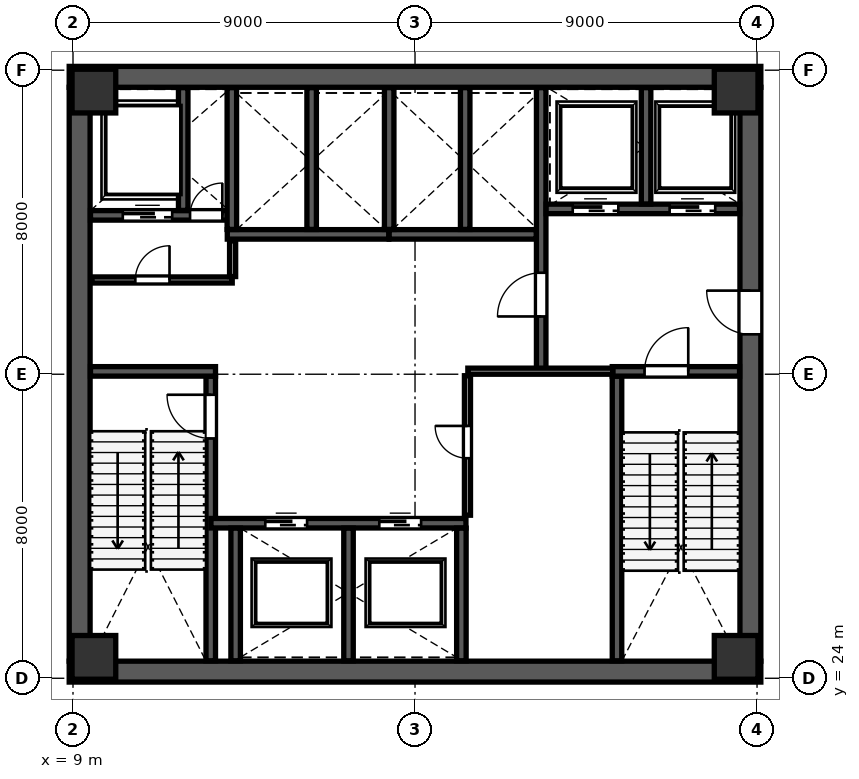
"""IFC4 building model, lengths in metres.
Left out: names, types, materials, properties, quantities, classifications, styles, units other than length and angle.
Written with IfcOpenShell. Run it as: python <this file> out.ifc"""

import sys

from ifc_helpers import new_model, si_unit, direction, frame, frame_2d, origin, origin_2d, place, context, subcontext, project, spatial, rectangle, extrude, source, transform, mapped, element, fill, save


model = new_model("IFC4")
c1 = context("Model", 3, precision=1e-05, world=origin(), true_north=direction((0.0, 1.0)))
c2 = subcontext(c1, "Body", "Model", "MODEL_VIEW")
j1 = project(units=[si_unit("LENGTHUNIT", "METRE"), si_unit("PLANEANGLEUNIT", "RADIAN")], contexts=[c1])
p1 = place(None, origin())
s1 = spatial("IfcSite", under=j1, at=p1, CompositionType="ELEMENT")
p2 = place(p1, origin())
s2 = spatial("IfcBuilding", under=s1, at=p2, CompositionType="ELEMENT")
p3 = place(p2, frame((0.0, 0.0, 32.8)))
s3 = spatial("IfcBuildingStorey", under=s2, at=p3, CompositionType="ELEMENT", Elevation=32.8)
m1 = source(origin(), c2, "Body", "SweptSolid", [
    extrude(rectangle(XDim=1.15, YDim=1.15, at=origin_2d()), origin(), (0.0, 0.0, 1.0), 4.799),
])
for number, where, z_axis, x_axis in (
    (1, (9.55, 24.55, 0.001), (0.0, 0.0, 1.0), (1.0, 0.0, 0.0)),
    (2, (26.45, 24.55, 0.001), (0.0, 0.0, 1.0), (1.0, 0.0, 0.0)),
    (3, (9.55, 39.45, 0.001), (0.0, 0.0, 1.0), (1.0, 0.0, 0.0)),
    (4, (26.45, 39.45, 0.001), (0.0, 0.0, 1.0), (1.0, 0.0, 0.0)),
):
    element("IfcColumn", number, at=place(p3, frame(where, z_axis=z_axis, x_axis=x_axis)), inside=s3, PredefinedType="COLUMN", context=c2, shape_type="MappedRepresentation", body=[
        mapped(m1, transform((0.0, 0.0, 0.0), scale=1.0)),
    ])
p4 = place(p3, frame((9.175, 24.45, 0.0), z_axis=(0.0, 0.0, 1.0), x_axis=(0.0, 1.0, 0.0)))
e5 = element("IfcWall", 5, at=p4, inside=s3, PredefinedType="SHEAR", context=c2, shape_type="SweptSolid", body=[
    extrude(rectangle(XDim=15.1, YDim=0.55, at=frame_2d((7.55, 0.0))), origin(), (0.0, 0.0, 1.0), 4.56),
])
p5 = place(p3, frame((26.825, 24.45, 0.0), z_axis=(0.0, 0.0, 1.0), x_axis=(0.0, 1.0, 0.0)))
e6 = element("IfcWall", 6, at=p5, inside=s3, PredefinedType="SHEAR", context=c2, shape_type="SweptSolid", body=[
    extrude(rectangle(XDim=15.1, YDim=0.55, at=frame_2d((7.55, 0.0))), origin(), (0.0, 0.0, 1.0), 4.56),
])
p6 = place(p5, frame((8.6, 0.0, 0.0)))
e7 = element("IfcOpeningElement", 7, at=p6, cuts=e6, PredefinedType="OPENING", context=c2, shape_type="SweptSolid", body=[
    extrude(rectangle(XDim=1.15, YDim=2.2, at=frame_2d((0.575, 1.1))), frame((0.0, 0.285, 0.0), z_axis=(0.0, -1.0, 0.0), x_axis=(1.0, 0.0, 0.0)), (0.0, 0.0, 1.0), 0.57),
])
for number, where, z_axis, x_axis in (
    (8, (8.9, 24.175, 0.0), (0.0, 0.0, 1.0), (1.0, 0.0, 0.0)),
    (9, (8.9, 39.825, 0.0), (0.0, 0.0, 1.0), (1.0, 0.0, 0.0)),
):
    element("IfcWall", number, at=place(p3, frame(where, z_axis=z_axis, x_axis=x_axis)), inside=s3, PredefinedType="SHEAR", context=c2, shape_type="SweptSolid", body=[
        extrude(rectangle(XDim=18.2, YDim=0.55, at=frame_2d((9.1, 0.0))), origin(), (0.0, 0.0, 1.0), 4.56),
    ])
p7 = place(p3, frame((12.625, 24.46, 0.0), z_axis=(0.0, 0.0, 1.0), x_axis=(0.0, 1.0, 0.0)))
e10 = element("IfcWall", 10, at=p7, inside=s3, PredefinedType="SHEAR", context=c2, shape_type="SweptSolid", body=[
    extrude(rectangle(XDim=7.49, YDim=0.25, at=frame_2d((3.745, 0.0))), origin(), (0.0, 0.0, 1.0), 4.56),
])
p8 = place(p7, frame((5.85, 0.0, 0.0)))
e11 = element("IfcOpeningElement", 11, at=p8, cuts=e10, PredefinedType="OPENING", context=c2, shape_type="SweptSolid", body=[
    extrude(rectangle(XDim=1.15, YDim=2.2, at=frame_2d((0.575, 1.1))), frame((0.0, 0.135, 0.0), z_axis=(0.0, -1.0, 0.0), x_axis=(1.0, 0.0, 0.0)), (0.0, 0.0, 1.0), 0.27),
])
p9 = place(p3, frame((9.46, 32.075, 0.0), z_axis=(0.0, 0.0, 1.0), x_axis=(1.0, 0.0, 0.0)))
e12 = element("IfcWall", 12, at=p9, inside=s3, PredefinedType="SHEAR", context=c2, shape_type="SweptSolid", body=[
    extrude(rectangle(XDim=3.29, YDim=0.25, at=frame_2d((1.645, 0.0))), origin(), (0.0, 0.0, 1.0), 4.56),
])
p10 = place(p3, frame((23.315, 24.46, 0.0), z_axis=(0.0, 0.0, 1.0), x_axis=(0.0, 1.0, 0.0)))
e13 = element("IfcWall", 13, at=p10, inside=s3, PredefinedType="SHEAR", context=c2, shape_type="SweptSolid", body=[
    extrude(rectangle(XDim=7.49, YDim=0.25, at=frame_2d((3.745, 0.0))), origin(), (0.0, 0.0, 1.0), 4.56),
])
p11 = place(p3, frame((23.19, 32.075, 0.0), z_axis=(0.0, 0.0, 1.0), x_axis=(1.0, 0.0, 0.0)))
e14 = element("IfcWall", 14, at=p11, inside=s3, PredefinedType="SHEAR", context=c2, shape_type="SweptSolid", body=[
    extrude(rectangle(XDim=3.35, YDim=0.25, at=frame_2d((1.675, 0.0))), origin(), (0.0, 0.0, 1.0), 4.56),
])
p12 = place(p11, frame((0.85, 0.0, 0.0)))
e15 = element("IfcOpeningElement", 15, at=p12, cuts=e14, PredefinedType="OPENING", context=c2, shape_type="SweptSolid", body=[
    extrude(rectangle(XDim=1.15, YDim=2.2, at=frame_2d((0.575, 1.1))), frame((0.0, 0.135, 0.0), z_axis=(0.0, -1.0, 0.0), x_axis=(1.0, 0.0, 0.0)), (0.0, 0.0, 1.0), 0.27),
])
p13 = place(p3, frame((21.32, 32.12, 0.0), z_axis=(0.0, 0.0, 1.0), x_axis=(0.0, 1.0, 0.0)))
e16 = element("IfcWall", 16, at=p13, inside=s3, PredefinedType="SHEAR", context=c2, shape_type="SweptSolid", body=[
    extrude(rectangle(XDim=7.42, YDim=0.25, at=frame_2d((3.71, 0.0))), origin(), (0.0, 0.0, 1.0), 4.56),
])
p14 = place(p13, frame((1.4, 0.0, 0.0)))
e17 = element("IfcOpeningElement", 17, at=p14, cuts=e16, PredefinedType="OPENING", context=c2, shape_type="SweptSolid", body=[
    extrude(rectangle(XDim=1.15, YDim=2.2, at=frame_2d((0.575, 1.1))), frame((0.0, 0.135, 0.0), z_axis=(0.0, -1.0, 0.0), x_axis=(1.0, 0.0, 0.0)), (0.0, 0.0, 1.0), 0.27),
])
p15 = place(p3, frame((9.46, 36.18, 0.0), z_axis=(0.0, 0.0, 1.0), x_axis=(1.0, 0.0, 0.0)))
e18 = element("IfcWall", 18, at=p15, inside=s3, PredefinedType="SHEAR", context=c2, shape_type="SweptSolid", body=[
    extrude(rectangle(XDim=3.79, YDim=0.25, at=frame_2d((1.895, 0.0))), origin(), (0.0, 0.0, 1.0), 4.56),
])
p16 = place(p15, frame((2.62, 0.0, 0.0)))
e19 = element("IfcOpeningElement", 19, at=p16, cuts=e18, PredefinedType="OPENING", context=c2, shape_type="SweptSolid", body=[
    extrude(rectangle(XDim=0.85, YDim=2.1, at=frame_2d((0.425, 1.05))), frame((0.0, 0.135, 0.0), z_axis=(0.0, -1.0, 0.0), x_axis=(1.0, 0.0, 0.0)), (0.0, 0.0, 1.0), 0.27),
])
p17 = place(p15, frame((0.85, 0.0, 0.0)))
e20 = element("IfcOpeningElement", 20, at=p17, cuts=e18, PredefinedType="OPENING", context=c2, shape_type="SweptSolid", body=[
    extrude(rectangle(XDim=1.3, YDim=2.25, at=frame_2d((0.65, 1.125))), frame((0.0, 0.135, 0.0), z_axis=(0.0, -1.0, 0.0), x_axis=(1.0, 0.0, 0.0)), (0.0, 0.0, 1.0), 0.27),
])
p18 = place(p3, frame((11.9, 36.31, 0.0), z_axis=(0.0, 0.0, 1.0), x_axis=(0.0, 1.0, 0.0)))
e21 = element("IfcWall", 21, at=p18, inside=s3, PredefinedType="SHEAR", context=c2, shape_type="SweptSolid", body=[
    extrude(rectangle(XDim=3.23, YDim=0.25, at=frame_2d((1.615, 0.0))), origin(), (0.0, 0.0, 1.0), 4.56),
])
p19 = place(p3, frame((21.45, 36.35, 0.0), z_axis=(0.0, 0.0, 1.0), x_axis=(1.0, 0.0, 0.0)))
e22 = element("IfcWall", 22, at=p19, inside=s3, PredefinedType="SHEAR", context=c2, shape_type="SweptSolid", body=[
    extrude(rectangle(XDim=5.09, YDim=0.25, at=frame_2d((2.545, 0.0))), origin(), (0.0, 0.0, 1.0), 4.56),
])
p20 = place(p19, frame((0.7, 0.0, 0.0)))
e23 = element("IfcOpeningElement", 23, at=p20, cuts=e22, PredefinedType="OPENING", context=c2, shape_type="SweptSolid", body=[
    extrude(rectangle(XDim=1.2, YDim=2.2, at=frame_2d((0.6, 1.1))), frame((0.0, 0.135, 0.0), z_axis=(0.0, -1.0, 0.0), x_axis=(1.0, 0.0, 0.0)), (0.0, 0.0, 1.0), 0.27),
])
p21 = place(p19, frame((3.25, 0.0, 0.0)))
e24 = element("IfcOpeningElement", 24, at=p21, cuts=e22, PredefinedType="OPENING", context=c2, shape_type="SweptSolid", body=[
    extrude(rectangle(XDim=1.2, YDim=2.2, at=frame_2d((0.6, 1.1))), frame((0.0, 0.135, 0.0), z_axis=(0.0, -1.0, 0.0), x_axis=(1.0, 0.0, 0.0)), (0.0, 0.0, 1.0), 0.27),
])
p22 = place(p3, frame((24.08, 36.48, 0.0), z_axis=(0.0, 0.0, 1.0), x_axis=(0.0, 1.0, 0.0)))
e25 = element("IfcWall", 25, at=p22, inside=s3, PredefinedType="SHEAR", context=c2, shape_type="SweptSolid", body=[
    extrude(rectangle(XDim=3.06, YDim=0.25, at=frame_2d((1.53, 0.0))), origin(), (0.0, 0.0, 1.0), 4.56),
])
p23 = place(p3, frame((12.63, 28.08, 0.0), z_axis=(0.0, 0.0, 1.0), x_axis=(1.0, 0.0, 0.0)))
e26 = element("IfcWall", 26, at=p23, inside=s3, PredefinedType="SHEAR", context=c2, shape_type="SweptSolid", body=[
    extrude(rectangle(XDim=6.71, YDim=0.25, at=frame_2d((3.355, 0.0))), origin(), (0.0, 0.0, 1.0), 4.56),
])
p24 = place(p23, frame((1.43, 0.0, 0.0)))
e27 = element("IfcOpeningElement", 27, at=p24, cuts=e26, PredefinedType="OPENING", context=c2, shape_type="SweptSolid", body=[
    extrude(rectangle(XDim=1.1, YDim=2.2, at=frame_2d((0.55, 1.1))), frame((0.0, 0.135, 0.0), z_axis=(0.0, -1.0, 0.0), x_axis=(1.0, 0.0, 0.0)), (0.0, 0.0, 1.0), 0.27),
])
p25 = place(p23, frame((4.43, 0.0, 0.0)))
e28 = element("IfcOpeningElement", 28, at=p25, cuts=e26, PredefinedType="OPENING", context=c2, shape_type="SweptSolid", body=[
    extrude(rectangle(XDim=1.1, YDim=2.2, at=frame_2d((0.55, 1.1))), frame((0.0, 0.135, 0.0), z_axis=(0.0, -1.0, 0.0), x_axis=(1.0, 0.0, 0.0)), (0.0, 0.0, 1.0), 0.27),
])
for number, where, z_axis, x_axis in (
    (29, (13.28, 24.46, 0.0), (0.0, 0.0, 1.0), (0.0, 1.0, 0.0)),
    (30, (16.25, 24.46, 0.0), (0.0, 0.0, 1.0), (0.0, 1.0, 0.0)),
    (31, (19.22, 24.46, 0.0), (0.0, 0.0, 1.0), (0.0, 1.0, 0.0)),
):
    element("IfcWall", number, at=place(p3, frame(where, z_axis=z_axis, x_axis=x_axis)), inside=s3, PredefinedType="SHEAR", context=c2, shape_type="SweptSolid", body=[
        extrude(rectangle(XDim=3.49, YDim=0.25, at=frame_2d((1.745, 0.0))), origin(), (0.0, 0.0, 1.0), 4.56),
    ])
p26 = place(p3, frame((13.06, 35.68, 0.0), z_axis=(0.0, 0.0, 1.0), x_axis=(1.0, 0.0, 0.0)))
e32 = element("IfcWall", 32, at=p26, inside=s3, PredefinedType="SHEAR", context=c2, shape_type="SweptSolid", body=[
    extrude(rectangle(XDim=4.25, YDim=0.25, at=frame_2d((2.125, 0.0))), origin(), (0.0, 0.0, 1.0), 4.56),
])
for number, where, z_axis, x_axis in (
    (33, (13.18, 35.81, 0.0), (0.0, 0.0, 1.0), (0.0, 1.0, 0.0)),
    (34, (15.28, 35.81, 0.0), (0.0, 0.0, 1.0), (0.0, 1.0, 0.0)),
):
    element("IfcWall", number, at=place(p3, frame(where, z_axis=z_axis, x_axis=x_axis)), inside=s3, PredefinedType="SHEAR", context=c2, shape_type="SweptSolid", body=[
        extrude(rectangle(XDim=3.73, YDim=0.25, at=frame_2d((1.865, 0.0))), origin(), (0.0, 0.0, 1.0), 4.56),
    ])
p27 = place(p3, frame((17.32, 35.68, 0.0), z_axis=(0.0, 0.0, 1.0), x_axis=(1.0, 0.0, 0.0)))
e35 = element("IfcWall", 35, at=p27, inside=s3, PredefinedType="SHEAR", context=c2, shape_type="SweptSolid", body=[
    extrude(rectangle(XDim=3.87, YDim=0.25, at=frame_2d((1.935, 0.0))), origin(), (0.0, 0.0, 1.0), 4.56),
])
for number, where, z_axis, x_axis in (
    (36, (17.32, 35.81, 0.0), (0.0, 0.0, 1.0), (0.0, 1.0, 0.0)),
    (37, (19.32, 35.81, 0.0), (0.0, 0.0, 1.0), (0.0, 1.0, 0.0)),
):
    element("IfcWall", number, at=place(p3, frame(where, z_axis=z_axis, x_axis=x_axis)), inside=s3, PredefinedType="SHEAR", context=c2, shape_type="SweptSolid", body=[
        extrude(rectangle(XDim=3.73, YDim=0.25, at=frame_2d((1.865, 0.0))), origin(), (0.0, 0.0, 1.0), 4.56),
    ])
p28 = place(p3, frame((9.49, 34.48, 0.0), z_axis=(0.0, 0.0, 1.0), x_axis=(1.0, 0.0, 0.0)))
e38 = element("IfcWall", 38, at=p28, inside=s3, PredefinedType="PARTITIONING", context=c2, shape_type="SweptSolid", body=[
    extrude(rectangle(XDim=3.7, YDim=0.16, at=frame_2d((1.85, 0.0))), origin(), (0.0, 0.0, 1.0), 4.56),
])
p29 = place(p28, frame((1.15, 0.0, 0.0)))
e39 = element("IfcOpeningElement", 39, at=p29, cuts=e38, PredefinedType="OPENING", context=c2, shape_type="SweptSolid", body=[
    extrude(rectangle(XDim=0.9, YDim=2.15, at=frame_2d((0.45, 1.075))), frame((0.0, 0.09, 0.0), z_axis=(0.0, -1.0, 0.0), x_axis=(1.0, 0.0, 0.0)), (0.0, 0.0, 1.0), 0.18),
])
p30 = place(p3, frame((13.2, 34.57, 0.0), z_axis=(0.0, 0.0, 1.0), x_axis=(0.0, 1.0, 0.0)))
e40 = element("IfcWall", 40, at=p30, inside=s3, PredefinedType="PARTITIONING", context=c2, shape_type="SweptSolid", body=[
    extrude(rectangle(XDim=0.94, YDim=0.16, at=frame_2d((0.47, 0.0))), origin(), (0.0, 0.0, 1.0), 4.56),
])
p31 = place(p3, frame((19.39, 32.08, 0.0), z_axis=(0.0, 0.0, 1.0), x_axis=(1.0, 0.0, 0.0)))
e41 = element("IfcWall", 41, at=p31, inside=s3, PredefinedType="PARTITIONING", context=c2, shape_type="SweptSolid", body=[
    extrude(rectangle(XDim=3.82, YDim=0.16, at=frame_2d((1.91, 0.0))), origin(), (0.0, 0.0, 1.0), 4.56),
])
p32 = place(p3, frame((19.38, 28.29, 0.0), z_axis=(0.0, 0.0, 1.0), x_axis=(0.0, 1.0, 0.0)))
e42 = element("IfcWall", 42, at=p32, inside=s3, PredefinedType="PARTITIONING", context=c2, shape_type="SweptSolid", body=[
    extrude(rectangle(XDim=3.67, YDim=0.16, at=frame_2d((1.835, 0.0))), origin(), (0.0, 0.0, 1.0), 4.56),
])
p33 = place(p32, frame((1.5, 0.0, 0.0)))
e43 = element("IfcOpeningElement", 43, at=p33, cuts=e42, PredefinedType="OPENING", context=c2, shape_type="SweptSolid", body=[
    extrude(rectangle(XDim=0.85, YDim=2.1, at=frame_2d((0.425, 1.05))), frame((0.0, 0.09, 0.0), z_axis=(0.0, -1.0, 0.0), x_axis=(1.0, 0.0, 0.0)), (0.0, 0.0, 1.0), 0.18),
])
m2 = source(origin(), c2, "Body", "SweptSolid", [
    extrude(rectangle(XDim=1.15, YDim=2.2, at=frame_2d((0.575, 1.1))), frame((0.0, 0.025, 0.0), z_axis=(0.0, -1.0, 0.0), x_axis=(1.0, 0.0, 0.0)), (0.0, 0.0, 1.0), 0.05),
])
p34 = place(p8, origin())
e44 = element("IfcDoor", 44, at=p34, inside=s3, OperationType="SINGLE_SWING_RIGHT", PredefinedType="DOOR", context=c2, shape_type="MappedRepresentation", body=[
    mapped(m2, transform((0.0, 0.0, 0.0), scale=1.0)),
])
fill(e11, e44)
m3 = source(origin(), c2, "Body", "SweptSolid", [
    extrude(rectangle(XDim=1.15, YDim=2.2, at=frame_2d((0.575, 1.1))), frame((0.0, 0.025, 0.0), z_axis=(0.0, -1.0, 0.0), x_axis=(1.0, 0.0, 0.0)), (0.0, 0.0, 1.0), 0.05),
])
p35 = place(p14, origin())
e45 = element("IfcDoor", 45, at=p35, inside=s3, OperationType="SINGLE_SWING_LEFT", PredefinedType="DOOR", context=c2, shape_type="MappedRepresentation", body=[
    mapped(m3, transform((0.0, 0.0, 0.0), scale=1.0)),
])
fill(e17, e45)
p36 = place(p12, origin())
e46 = element("IfcDoor", 46, at=p36, inside=s3, OperationType="SINGLE_SWING_RIGHT", PredefinedType="DOOR", context=c2, shape_type="MappedRepresentation", body=[
    mapped(m2, transform((0.0, 0.0, 0.0), scale=1.0)),
])
fill(e15, e46)
p37 = place(p6, origin())
e47 = element("IfcDoor", 47, at=p37, inside=s3, OperationType="SINGLE_SWING_RIGHT", PredefinedType="DOOR", context=c2, shape_type="MappedRepresentation", body=[
    mapped(m3, transform((0.0, 0.0, 0.0), scale=1.0)),
])
fill(e7, e47)
m4 = source(origin(), c2, "Body", "SweptSolid", [
    extrude(rectangle(XDim=0.85, YDim=2.1, at=frame_2d((0.425, 1.05))), frame((0.0, 0.025, 0.0), z_axis=(0.0, -1.0, 0.0), x_axis=(1.0, 0.0, 0.0)), (0.0, 0.0, 1.0), 0.05),
])
p38 = place(p16, origin())
e48 = element("IfcDoor", 48, at=p38, inside=s3, OperationType="SINGLE_SWING_RIGHT", PredefinedType="DOOR", context=c2, shape_type="MappedRepresentation", body=[
    mapped(m4, transform((0.0, 0.0, 0.0), scale=1.0)),
])
fill(e19, e48)
m5 = source(origin(), c2, "Body", "SweptSolid", [
    extrude(rectangle(XDim=1.1, YDim=2.2, at=frame_2d((0.55, 1.1))), frame((0.0, 0.025, 0.0), z_axis=(0.0, -1.0, 0.0), x_axis=(1.0, 0.0, 0.0)), (0.0, 0.0, 1.0), 0.05),
])
p39 = place(p24, origin())
e49 = element("IfcDoor", 49, at=p39, inside=s3, OperationType="SLIDING_TO_LEFT", PredefinedType="DOOR", context=c2, shape_type="MappedRepresentation", body=[
    mapped(m5, transform((0.0, 0.0, 0.0), scale=1.0)),
])
fill(e27, e49)
p40 = place(p25, origin())
e50 = element("IfcDoor", 50, at=p40, inside=s3, OperationType="SLIDING_TO_RIGHT", PredefinedType="DOOR", context=c2, shape_type="MappedRepresentation", body=[
    mapped(m5, transform((0.0, 0.0, 0.0), scale=1.0)),
])
fill(e28, e50)
m6 = source(origin(), c2, "Body", "SweptSolid", [
    extrude(rectangle(XDim=1.2, YDim=2.2, at=frame_2d((0.6, 1.1))), frame((0.0, 0.025, 0.0), z_axis=(0.0, -1.0, 0.0), x_axis=(1.0, 0.0, 0.0)), (0.0, 0.0, 1.0), 0.05),
])
p41 = place(p20, origin())
e51 = element("IfcDoor", 51, at=p41, inside=s3, OperationType="SLIDING_TO_LEFT", PredefinedType="DOOR", context=c2, shape_type="MappedRepresentation", body=[
    mapped(m6, transform((0.0, 0.0, 0.0), scale=1.0)),
])
fill(e23, e51)
p42 = place(p21, origin())
e52 = element("IfcDoor", 52, at=p42, inside=s3, OperationType="SLIDING_TO_RIGHT", PredefinedType="DOOR", context=c2, shape_type="MappedRepresentation", body=[
    mapped(m6, transform((0.0, 0.0, 0.0), scale=1.0)),
])
fill(e24, e52)
m7 = source(origin(), c2, "Body", "SweptSolid", [
    extrude(rectangle(XDim=1.3, YDim=2.25, at=frame_2d((0.65, 1.125))), frame((0.0, 0.025, 0.0), z_axis=(0.0, -1.0, 0.0), x_axis=(1.0, 0.0, 0.0)), (0.0, 0.0, 1.0), 0.05),
])
p43 = place(p17, origin())
e53 = element("IfcDoor", 53, at=p43, inside=s3, OperationType="SLIDING_TO_LEFT", PredefinedType="DOOR", context=c2, shape_type="MappedRepresentation", body=[
    mapped(m7, transform((0.0, 0.0, 0.0), scale=1.0)),
])
fill(e20, e53)
m8 = source(origin(), c2, "Body", "SweptSolid", [
    extrude(rectangle(XDim=0.9, YDim=2.15, at=frame_2d((0.45, 1.075))), frame((0.0, 0.025, 0.0), z_axis=(0.0, -1.0, 0.0), x_axis=(1.0, 0.0, 0.0)), (0.0, 0.0, 1.0), 0.05),
])
p44 = place(p29, origin())
e54 = element("IfcDoor", 54, at=p44, inside=s3, OperationType="SINGLE_SWING_RIGHT", PredefinedType="DOOR", context=c2, shape_type="MappedRepresentation", body=[
    mapped(m8, transform((0.0, 0.0, 0.0), scale=1.0)),
])
fill(e39, e54)
p45 = place(p33, origin())
e55 = element("IfcDoor", 55, at=p45, inside=s3, OperationType="SINGLE_SWING_RIGHT", PredefinedType="DOOR", context=c2, shape_type="MappedRepresentation", body=[
    mapped(m4, transform((0.0, 0.0, 0.0), scale=1.0)),
])
fill(e43, e55)
save(model, sys.argv[1])
